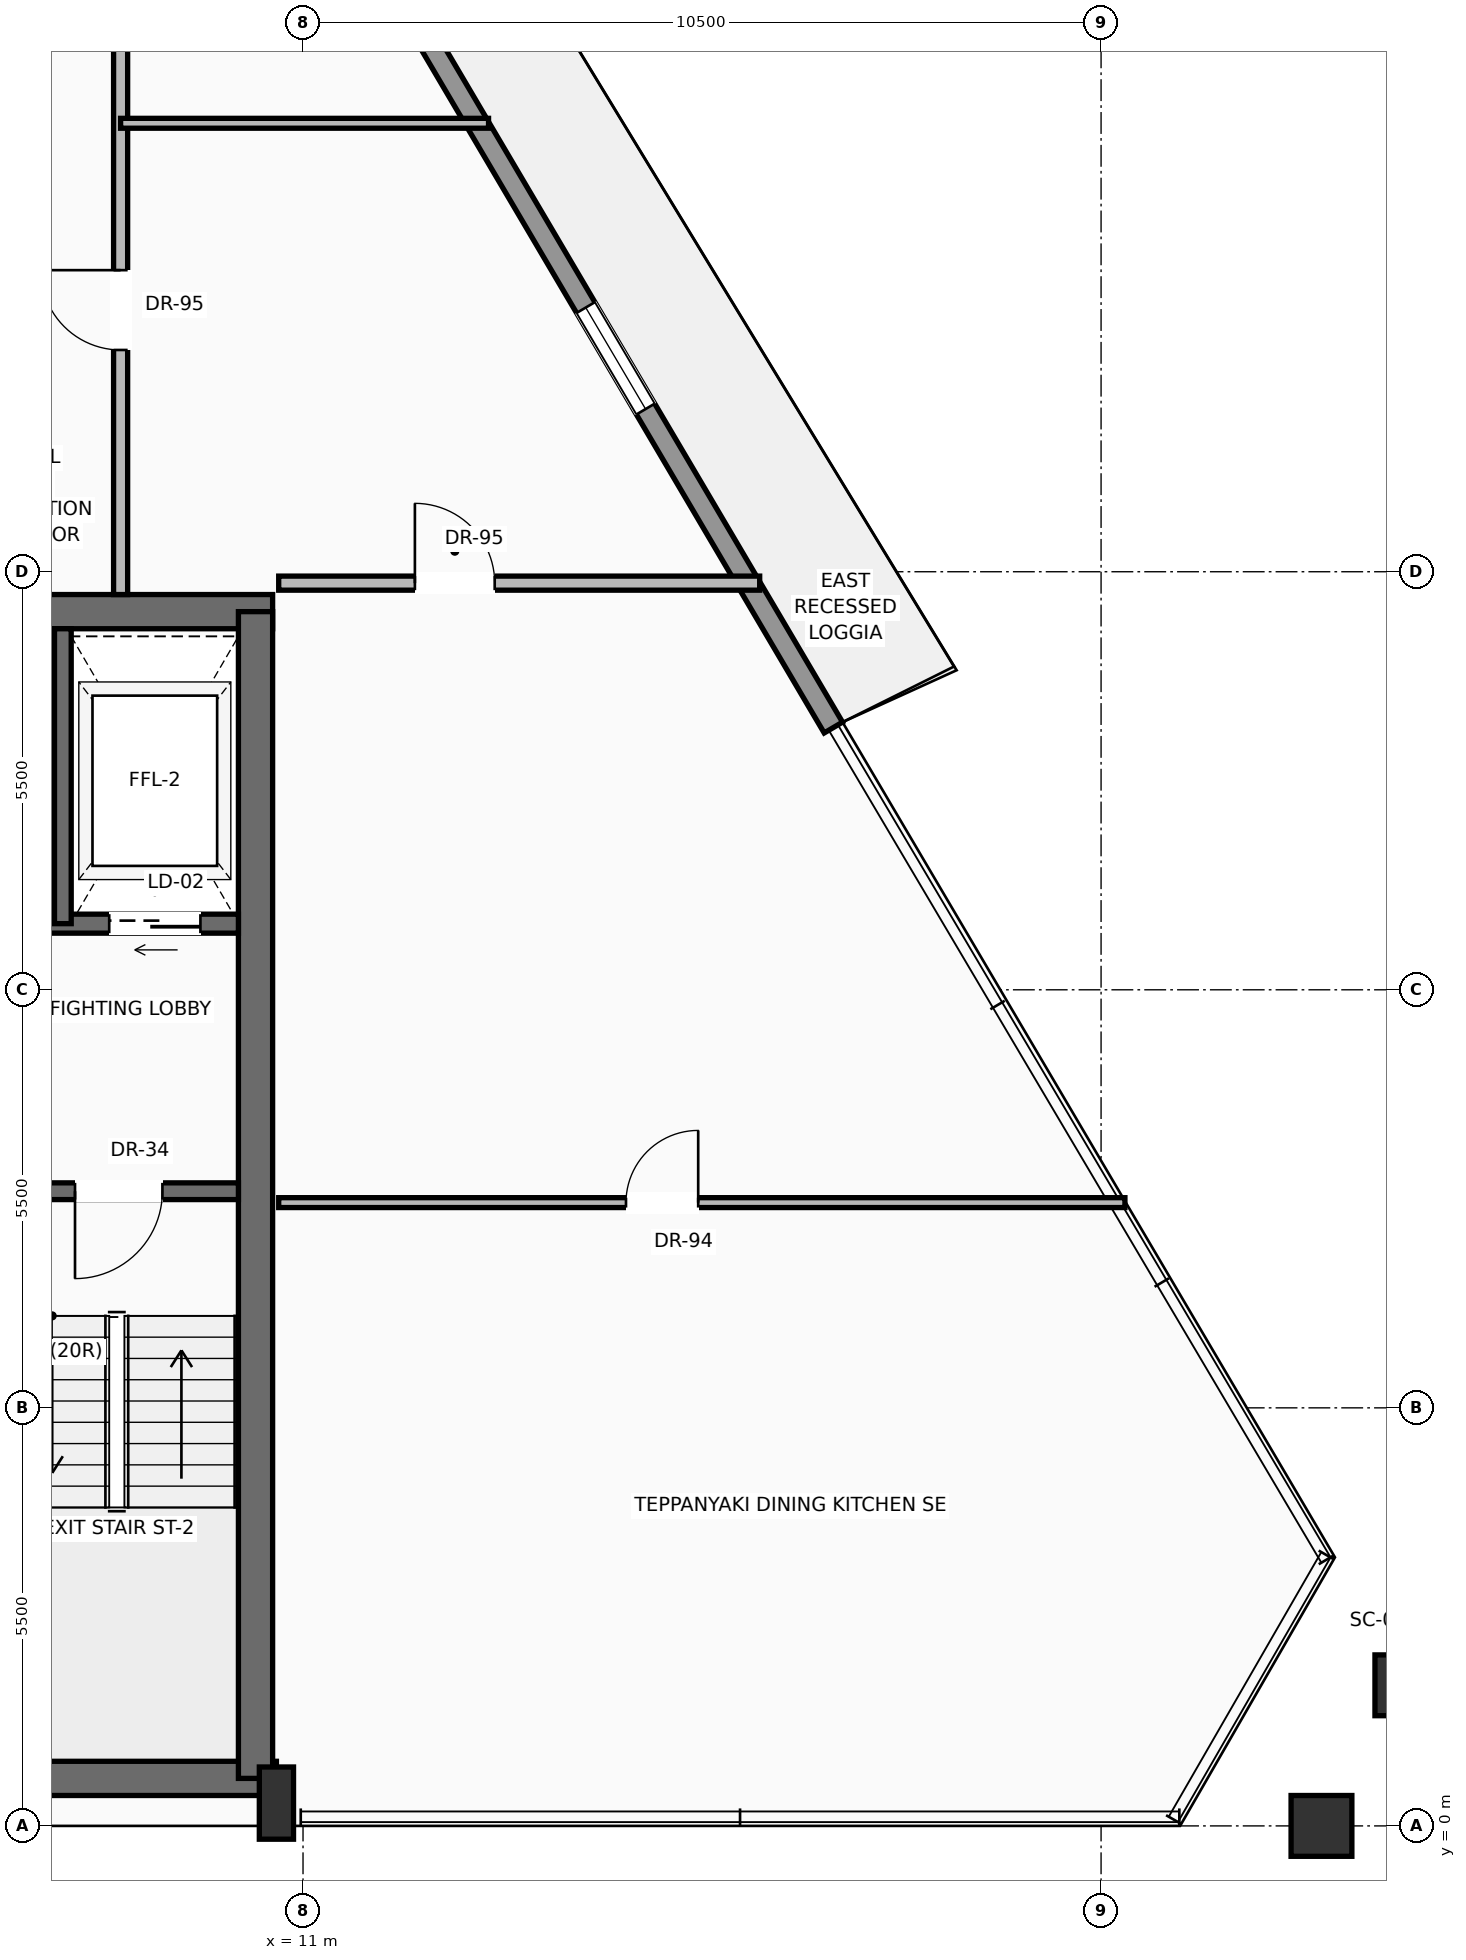
"""IFC4 building model, lengths in metres.
Left out: names, types, materials, properties, quantities, classifications, styles, units other than length and angle.
Written with IfcOpenShell. Run it as: python <this file> out.ifc"""

import sys

from ifc_helpers import new_model, si_unit, direction, frame, frame_2d, origin, origin_2d, place, context, subcontext, project, spatial, rectangle, hollow_rectangle, extrude, source, transform, mapped, element, fill, save


model = new_model("IFC4")
c1 = context("Model", 3, precision=1e-05, world=origin(), true_north=direction((0.0, 1.0)))
c2 = subcontext(c1, "Body", "Model", "MODEL_VIEW")
j1 = project(units=[si_unit("LENGTHUNIT", "METRE"), si_unit("PLANEANGLEUNIT", "RADIAN")], contexts=[c1])
p1 = place(None, origin())
s1 = spatial("IfcSite", under=j1, at=p1, CompositionType="ELEMENT")
p2 = place(p1, origin())
s2 = spatial("IfcBuilding", under=s1, at=p2, CompositionType="ELEMENT")
p3 = place(p2, frame((0.0, 0.0, 279.9)))
s3 = spatial("IfcBuildingStorey", under=s2, at=p3, CompositionType="ELEMENT", Elevation=279.9)
p4 = place(p3, frame((-10.65, 0.625, 0.0), z_axis=(0.0, 0.0, 1.0), x_axis=(1.0, 0.0, 0.0)))
e1 = element("IfcWall", 1, at=p4, inside=s3, PredefinedType="SHEAR", context=c2, shape_type="SweptSolid", body=[
    extrude(rectangle(XDim=21.3, YDim=0.45, at=frame_2d((10.65, 0.0))), origin(), (0.0, 0.0, 1.0), 3.24),
])
p5 = place(p3, frame((-10.6, 15.975, 0.0), z_axis=(0.0, 0.0, 1.0), x_axis=(1.0, 0.0, 0.0)))
e2 = element("IfcWall", 2, at=p5, inside=s3, PredefinedType="SHEAR", context=c2, shape_type="SweptSolid", body=[
    extrude(rectangle(XDim=21.2, YDim=0.45, at=frame_2d((10.6, 0.0))), origin(), (0.0, 0.0, 1.0), 3.24),
])
p6 = place(p5, frame((3.17, 0.0, 0.0)))
e3 = element("IfcOpeningElement", 3, at=p6, cuts=e2, PredefinedType="OPENING", context=c2, shape_type="SweptSolid", body=[
    extrude(rectangle(XDim=1.3, YDim=2.3, at=frame_2d((0.65, 1.15))), frame((0.0, 0.235, 0.0), z_axis=(0.0, -1.0, 0.0), x_axis=(1.0, 0.0, 0.0)), (0.0, 0.0, 1.0), 0.47),
])
p7 = place(p5, frame((9.6, 0.0, 0.0)))
e4 = element("IfcOpeningElement", 4, at=p7, cuts=e2, PredefinedType="OPENING", context=c2, shape_type="SweptSolid", body=[
    extrude(rectangle(XDim=2.0, YDim=2.4, at=frame_2d((1.0, 1.2))), frame((0.0, 0.235, 0.0), z_axis=(0.0, -1.0, 0.0), x_axis=(1.0, 0.0, 0.0)), (0.0, 0.0, 1.0), 0.47),
])
p8 = place(p3, frame((10.375, 0.625, 0.0), z_axis=(0.0, 0.0, 1.0), x_axis=(0.0, 1.0, 0.0)))
e5 = element("IfcWall", 5, at=p8, inside=s3, PredefinedType="SHEAR", context=c2, shape_type="SweptSolid", body=[
    extrude(rectangle(XDim=15.35, YDim=0.45, at=frame_2d((7.675, 0.0))), origin(), (0.0, 0.0, 1.0), 3.24),
])
m1 = source(origin(), c2, "Body", "SweptSolid", [
    extrude(rectangle(XDim=0.45, YDim=0.95, at=origin_2d()), origin(), (0.0, 0.0, 1.0), 3.45),
])
p9 = place(p3, frame((10.65, 0.3, 0.0), z_axis=(0.0, 0.0, 1.0), x_axis=(1.0, 0.0, 0.0)))
e6 = element("IfcColumn", 6, at=p9, inside=s3, PredefinedType="PILASTER", context=c2, shape_type="MappedRepresentation", body=[
    mapped(m1, transform((0.0, 0.0, 0.0), scale=1.0)),
])
m2 = source(origin(), c2, "Body", "SweptSolid", [
    extrude(hollow_rectangle(XDim=0.8, YDim=0.8, WallThickness=0.04, at=origin_2d()), origin(), (0.0, 0.0, 1.0), 3.441),
])
p10 = place(p3, frame((24.4, 0.0, 0.004), z_axis=(-0.003192378738, 0.0, 0.999994904346), x_axis=(0.0, -1.0, 0.0)))
e7 = element("IfcColumn", 7, at=p10, inside=s3, PredefinedType="COLUMN", context=c2, shape_type="MappedRepresentation", body=[
    mapped(m2, transform((0.0, 0.0, 0.0), scale=1.0)),
])
m3 = source(origin(), c2, "Body", "SweptSolid", [
    extrude(hollow_rectangle(XDim=0.8, YDim=0.8, WallThickness=0.04, at=origin_2d()), origin(), (0.0, 0.0, 1.0), 3.442),
])
p11 = place(p3, frame((25.503, 1.85, 0.004), z_axis=(-0.012766984447, -0.015604092101, 0.999796737551), x_axis=(0.773957299203, -0.633237790257, 0.0)))
e8 = element("IfcColumn", 8, at=p11, inside=s3, PredefinedType="COLUMN", context=c2, shape_type="MappedRepresentation", body=[
    mapped(m3, transform((0.0, 0.0, 0.0), scale=1.0)),
])
p12 = place(p3, frame((7.796, 31.717, 0.0), z_axis=(0.0, 0.0, 1.0), x_axis=(0.507930566701, -0.861398014515, 0.0)))
e9 = element("IfcWall", 9, at=p12, inside=s3, PredefinedType="SOLIDWALL", context=c2, shape_type="SweptSolid", body=[
    extrude(rectangle(XDim=20.045, YDim=0.28, at=frame_2d((10.022, 0.0))), origin(), (0.0, 0.0, 1.0), 2.82),
])
p13 = place(p12, frame((4.811, 0.0, 0.0)))
e10 = element("IfcOpeningElement", 10, at=p13, cuts=e9, PredefinedType="OPENING", context=c2, shape_type="SweptSolid", body=[
    extrude(rectangle(XDim=1.6, YDim=2.35, at=frame_2d((0.8, 1.175))), frame((0.0, 0.15, 0.0), z_axis=(0.0, -1.0, 0.0), x_axis=(1.0, 0.0, 0.0)), (0.0, 0.0, 1.0), 0.3),
])
p14 = place(p12, frame((13.63, 0.0, 0.9)))
e11 = element("IfcOpeningElement", 11, at=p14, cuts=e9, PredefinedType="OPENING", context=c2, shape_type="SweptSolid", body=[
    extrude(rectangle(XDim=1.55, YDim=1.75, at=frame_2d((0.775, 0.875))), frame((0.0, 0.15, 0.0), z_axis=(0.0, -1.0, 0.0), x_axis=(1.0, 0.0, 0.0)), (0.0, 0.0, 1.0), 0.3),
])
p15 = place(p3, frame((10.15, 8.35, 0.0), z_axis=(0.0, 0.0, 1.0), x_axis=(-1.0, 0.0, 0.0)))
e12 = element("IfcWall", 12, at=p15, inside=s3, PredefinedType="SOLIDWALL", context=c2, shape_type="SweptSolid", body=[
    extrude(rectangle(XDim=4.65, YDim=0.22, at=frame_2d((2.325, 0.0))), origin(), (0.0, 0.0, 1.0), 3.24),
])
p16 = place(p15, frame((1.0, 0.0, 0.0)))
e13 = element("IfcOpeningElement", 13, at=p16, cuts=e12, PredefinedType="OPENING", context=c2, shape_type="SweptSolid", body=[
    extrude(rectangle(XDim=1.15, YDim=2.2, at=frame_2d((0.575, 1.1))), frame((0.0, 0.12, 0.0), z_axis=(0.0, -1.0, 0.0), x_axis=(1.0, 0.0, 0.0)), (0.0, 0.0, 1.0), 0.24),
])
p17 = place(p3, frame((10.15, 11.87, 0.0), z_axis=(0.0, 0.0, 1.0), x_axis=(-1.0, 0.0, 0.0)))
e14 = element("IfcWall", 14, at=p17, inside=s3, PredefinedType="SOLIDWALL", context=c2, shape_type="SweptSolid", body=[
    extrude(rectangle(XDim=4.65, YDim=0.25, at=frame_2d((2.325, 0.0))), origin(), (0.0, 0.0, 1.0), 3.24),
])
p18 = place(p17, frame((0.5, 0.0, 0.0)))
e15 = element("IfcOpeningElement", 15, at=p18, cuts=e14, PredefinedType="OPENING", context=c2, shape_type="SweptSolid", body=[
    extrude(rectangle(XDim=1.2, YDim=2.25, at=frame_2d((0.6, 1.125))), frame((0.0, 0.135, 0.0), z_axis=(0.0, -1.0, 0.0), x_axis=(1.0, 0.0, 0.0)), (0.0, 0.0, 1.0), 0.27),
])
p19 = place(p3, frame((7.84, 11.87, 0.0), z_axis=(0.0, 0.0, 1.0), x_axis=(0.0, 1.0, 0.0)))
e16 = element("IfcWall", 16, at=p19, inside=s3, PredefinedType="SOLIDWALL", context=c2, shape_type="SweptSolid", body=[
    extrude(rectangle(XDim=3.88, YDim=0.22, at=frame_2d((1.94, 0.0))), origin(), (0.0, 0.0, 1.0), 3.24),
])
p20 = place(p3, frame((8.6, 16.2, 0.0), z_axis=(0.0, 0.0, 1.0), x_axis=(0.0, 1.0, 0.0)))
e17 = element("IfcWall", 17, at=p20, inside=s3, PredefinedType="PARTITIONING", context=c2, shape_type="SweptSolid", body=[
    extrude(rectangle(XDim=12.4, YDim=0.185, at=frame_2d((6.2, 0.0))), origin(), (0.0, 0.0, 1.0), 3.232),
])
p21 = place(p20, frame((3.218, 0.0, 0.0)))
e18 = element("IfcOpeningElement", 18, at=p21, cuts=e17, PredefinedType="OPENING", context=c2, shape_type="SweptSolid", body=[
    extrude(rectangle(XDim=1.05, YDim=2.25, at=frame_2d((0.525, 1.125))), frame((0.0, 0.103, 0.0), z_axis=(0.0, -1.0, 0.0), x_axis=(1.0, 0.0, 0.0)), (0.0, 0.0, 1.0), 0.205),
])
p22 = place(p20, frame((8.936, 0.0, 0.0)))
e19 = element("IfcOpeningElement", 19, at=p22, cuts=e17, PredefinedType="OPENING", context=c2, shape_type="SweptSolid", body=[
    extrude(rectangle(XDim=1.05, YDim=2.25, at=frame_2d((0.525, 1.125))), frame((0.0, 0.103, 0.0), z_axis=(0.0, -1.0, 0.0), x_axis=(1.0, 0.0, 0.0)), (0.0, 0.0, 1.0), 0.205),
])
p23 = place(p3, frame((10.68, 16.35, 0.0), z_axis=(0.0, 0.0, 1.0), x_axis=(1.0, 0.0, 0.0)))
e20 = element("IfcWall", 20, at=p23, inside=s3, PredefinedType="PARTITIONING", context=c2, shape_type="SweptSolid", body=[
    extrude(rectangle(XDim=6.328, YDim=0.185, at=frame_2d((3.164, 0.0))), origin(), (0.0, 0.0, 1.0), 3.232),
])
p24 = place(p23, frame((1.792, 0.0, 0.0)))
e21 = element("IfcOpeningElement", 21, at=p24, cuts=e20, PredefinedType="OPENING", context=c2, shape_type="SweptSolid", body=[
    extrude(rectangle(XDim=1.05, YDim=2.25, at=frame_2d((0.525, 1.125))), frame((0.0, 0.103, 0.0), z_axis=(0.0, -1.0, 0.0), x_axis=(1.0, 0.0, 0.0)), (0.0, 0.0, 1.0), 0.205),
])
p25 = place(p3, frame((10.68, 8.2, 0.0), z_axis=(0.0, 0.0, 1.0), x_axis=(1.0, 0.0, 0.0)))
e22 = element("IfcWall", 22, at=p25, inside=s3, PredefinedType="PARTITIONING", context=c2, shape_type="SweptSolid", body=[
    extrude(rectangle(XDim=11.134, YDim=0.13, at=frame_2d((5.567, 0.0))), origin(), (0.0, 0.0, 1.0), 3.232),
])
p26 = place(p25, frame((4.569, 0.0, 0.0)))
e23 = element("IfcOpeningElement", 23, at=p26, cuts=e22, PredefinedType="OPENING", context=c2, shape_type="SweptSolid", body=[
    extrude(rectangle(XDim=0.95, YDim=2.2, at=frame_2d((0.475, 1.1))), frame((0.0, 0.075, 0.0), z_axis=(0.0, -1.0, 0.0), x_axis=(1.0, 0.0, 0.0)), (0.0, 0.0, 1.0), 0.15),
])
p27 = place(p3, frame((8.6, 22.4, 0.0), z_axis=(0.0, 0.0, 1.0), x_axis=(1.0, 0.0, 0.0)))
e24 = element("IfcWall", 24, at=p27, inside=s3, PredefinedType="PARTITIONING", context=c2, shape_type="SweptSolid", body=[
    extrude(rectangle(XDim=4.841, YDim=0.13, at=frame_2d((2.42, 0.0))), origin(), (0.0, 0.0, 1.0), 3.232),
])
m4 = source(origin(), c2, "Body", "SweptSolid", [
    extrude(rectangle(XDim=1.55, YDim=1.75, at=frame_2d((0.775, 0.875))), frame((0.0, 0.03, 0.0), z_axis=(0.0, -1.0, 0.0), x_axis=(1.0, 0.0, 0.0)), (0.0, 0.0, 1.0), 0.06),
])
p28 = place(p14, origin())
e25 = element("IfcWindow", 25, at=p28, inside=s3, PartitioningType="SINGLE_PANEL", PredefinedType="WINDOW", context=c2, shape_type="MappedRepresentation", body=[
    mapped(m4, transform((0.0, 0.0, 0.0), scale=1.0)),
])
fill(e11, e25)
m5 = source(origin(), c2, "Body", "SweptSolid", [
    extrude(rectangle(XDim=1.15, YDim=2.2, at=frame_2d((0.575, 1.1))), frame((0.0, 0.025, 0.0), z_axis=(0.0, -1.0, 0.0), x_axis=(1.0, 0.0, 0.0)), (0.0, 0.0, 1.0), 0.05),
])
p29 = place(p16, origin())
e26 = element("IfcDoor", 26, at=p29, inside=s3, OperationType="SINGLE_SWING_RIGHT", PredefinedType="DOOR", context=c2, shape_type="MappedRepresentation", body=[
    mapped(m5, transform((0.0, 0.0, 0.0), scale=1.0)),
])
fill(e13, e26)
m6 = source(origin(), c2, "Body", "SweptSolid", [
    extrude(rectangle(XDim=1.2, YDim=2.25, at=frame_2d((0.6, 1.125))), frame((0.0, 0.025, 0.0), z_axis=(0.0, -1.0, 0.0), x_axis=(1.0, 0.0, 0.0)), (0.0, 0.0, 1.0), 0.05),
])
p30 = place(p18, origin())
e27 = element("IfcDoor", 27, at=p30, inside=s3, OperationType="SLIDING_TO_RIGHT", PredefinedType="DOOR", context=c2, shape_type="MappedRepresentation", body=[
    mapped(m6, transform((0.0, 0.0, 0.0), scale=1.0)),
])
fill(e15, e27)
m7 = source(origin(), c2, "Body", "SweptSolid", [
    extrude(rectangle(XDim=1.05, YDim=2.25, at=frame_2d((0.525, 1.125))), frame((0.0, 0.025, 0.0), z_axis=(0.0, -1.0, 0.0), x_axis=(1.0, 0.0, 0.0)), (0.0, 0.0, 1.0), 0.05),
])
p31 = place(p24, origin())
e28 = element("IfcDoor", 28, at=p31, inside=s3, OperationType="SINGLE_SWING_LEFT", PredefinedType="DOOR", context=c2, shape_type="MappedRepresentation", body=[
    mapped(m7, transform((0.0, 0.0, 0.0), scale=1.0)),
])
fill(e21, e28)
m8 = source(origin(), c2, "Body", "SweptSolid", [
    extrude(rectangle(XDim=0.95, YDim=2.2, at=frame_2d((0.475, 1.1))), frame((0.0, 0.025, 0.0), z_axis=(0.0, -1.0, 0.0), x_axis=(1.0, 0.0, 0.0)), (0.0, 0.0, 1.0), 0.05),
])
p32 = place(p26, origin())
e29 = element("IfcDoor", 29, at=p32, inside=s3, OperationType="SINGLE_SWING_RIGHT", PredefinedType="DOOR", context=c2, shape_type="MappedRepresentation", body=[
    mapped(m8, transform((0.0, 0.0, 0.0), scale=1.0)),
])
fill(e23, e29)
p33 = place(p21, origin())
e30 = element("IfcDoor", 30, at=p33, inside=s3, OperationType="SINGLE_SWING_RIGHT", PredefinedType="DOOR", context=c2, shape_type="MappedRepresentation", body=[
    mapped(m7, transform((0.0, 0.0, 0.0), scale=1.0)),
])
fill(e18, e30)
save(model, sys.argv[1])
